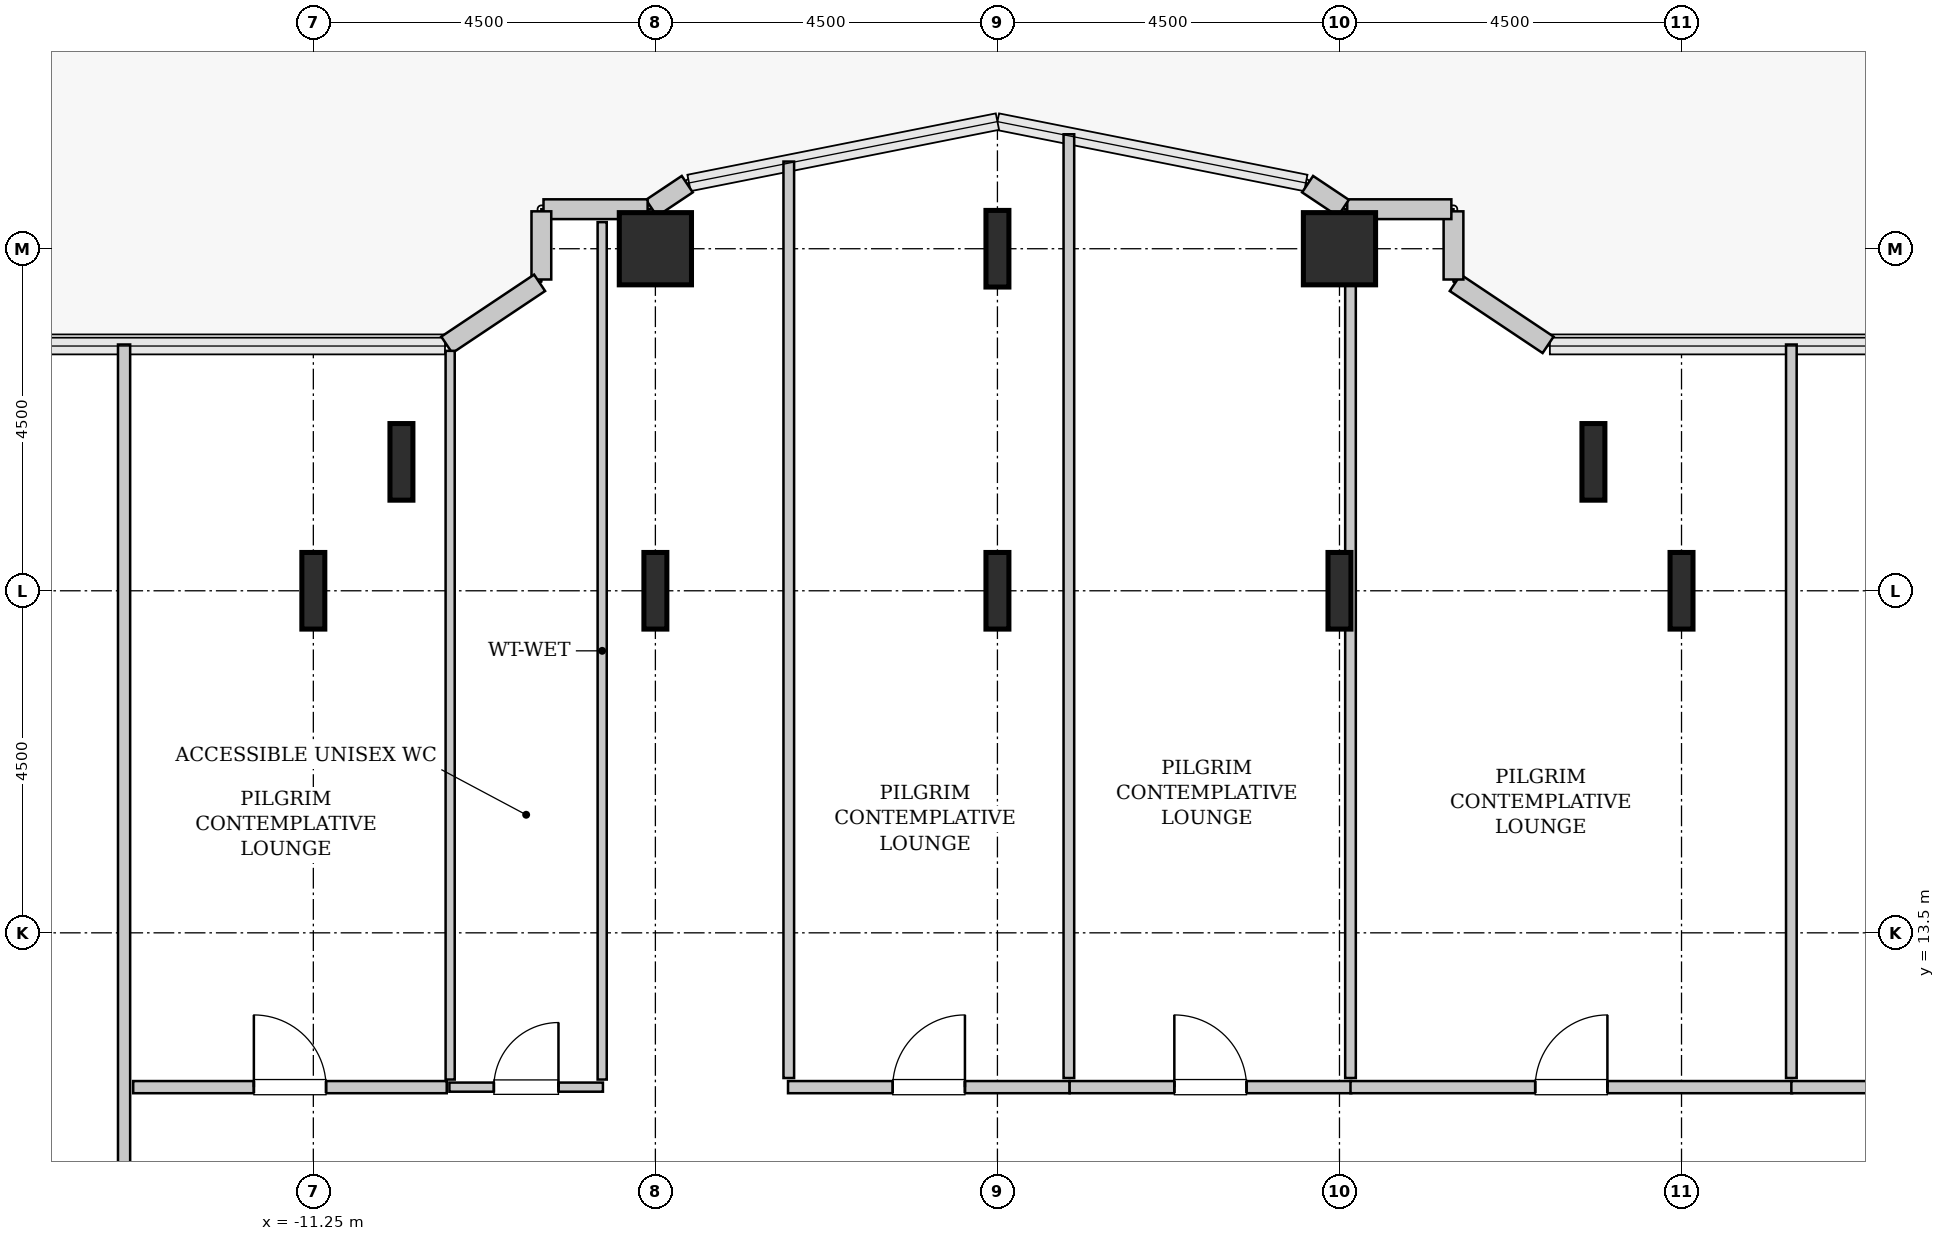
"""IFC4 building model, lengths in metres.
Left out: names, types, materials, properties, quantities, classifications, styles, units other than length and angle.
Written with IfcOpenShell. Run it as: python <this file> out.ifc"""

import sys

from ifc_helpers import new_model, si_unit, direction, frame, frame_2d, origin, origin_2d, place, context, subcontext, project, spatial, rectangle, hollow_rectangle, i_section, extrude, source, transform, mapped, element, fill, save


model = new_model("IFC4")
c1 = context("Model", 3, precision=1e-05, world=origin(), true_north=direction((0.0, 1.0)))
c2 = subcontext(c1, "Body", "Model", "MODEL_VIEW")
j1 = project(units=[si_unit("LENGTHUNIT", "METRE"), si_unit("PLANEANGLEUNIT", "RADIAN")], contexts=[c1])
p1 = place(None, origin())
s1 = spatial("IfcSite", under=j1, at=p1, CompositionType="ELEMENT")
p2 = place(p1, origin())
s2 = spatial("IfcBuilding", under=s1, at=p2, CompositionType="ELEMENT")
p3 = place(p2, frame((0.0, 0.0, 33.0)))
s3 = spatial("IfcBuildingStorey", under=s2, at=p3, CompositionType="ELEMENT", Elevation=33.0)
m1 = source(origin(), c2, "Body", "SweptSolid", [
    extrude(i_section(OverallWidth=0.302, OverallDepth=1.008, WebThickness=0.021, FlangeThickness=0.04, FilletRadius=0.03, at=origin_2d()), origin(), (0.0, 0.0, 1.0), 3.8),
])
for number, where, z_axis, x_axis in (
    (1, (-11.25, 18.0, 0.0), (0.0, 0.0, 1.0), (1.0, 0.0, 0.0)),
    (2, (-10.091, 19.696, 0.0), (0.0, 0.0, 1.0), (1.0, 0.0, 0.0)),
    (3, (-6.75, 18.0, 0.0), (0.0, 0.0, 1.0), (1.0, 0.0, 0.0)),
):
    element("IfcColumn", number, at=place(p3, frame(where, z_axis=z_axis, x_axis=x_axis)), inside=s3, PredefinedType="COLUMN", context=c2, shape_type="MappedRepresentation", body=[
        mapped(m1, transform((0.0, 0.0, 0.0), x_axis=(1.0, 0.0, 0.0), y_axis=(0.0, 1.0, 0.0), z_axis=(0.0, 0.0, 1.0), scale=1.0)),
    ])
m2 = source(origin(), c2, "Body", "SweptSolid", [
    extrude(hollow_rectangle(XDim=0.95, YDim=0.95, WallThickness=0.045, InnerFilletRadius=0.045, OuterFilletRadius=0.09, at=origin_2d()), origin(), (0.0, 0.0, 1.0), 3.8),
])
p4 = place(p3, frame((-6.75, 22.5, 0.0), z_axis=(0.0, 0.0, 1.0), x_axis=(1.0, 0.0, 0.0)))
e4 = element("IfcColumn", 4, at=p4, inside=s3, PredefinedType="COLUMN", context=c2, shape_type="MappedRepresentation", body=[
    mapped(m2, transform((0.0, 0.0, 0.0), x_axis=(1.0, 0.0, 0.0), y_axis=(0.0, 1.0, 0.0), z_axis=(0.0, 0.0, 1.0), scale=1.0)),
])
for number, where, z_axis, x_axis in (
    (5, (-2.25, 18.0, 0.0), (0.0, 0.0, 1.0), (1.0, 0.0, 0.0)),
    (6, (-2.25, 22.5, 0.0), (0.0, 0.0, 1.0), (1.0, 0.0, 0.0)),
    (7, (2.25, 18.0, 0.0), (0.0, 0.0, 1.0), (1.0, 0.0, 0.0)),
):
    element("IfcColumn", number, at=place(p3, frame(where, z_axis=z_axis, x_axis=x_axis)), inside=s3, PredefinedType="COLUMN", context=c2, shape_type="MappedRepresentation", body=[
        mapped(m1, transform((0.0, 0.0, 0.0), x_axis=(1.0, 0.0, 0.0), y_axis=(0.0, 1.0, 0.0), z_axis=(0.0, 0.0, 1.0), scale=1.0)),
    ])
p5 = place(p3, frame((2.25, 22.5, 0.0), z_axis=(0.0, 0.0, 1.0), x_axis=(1.0, 0.0, 0.0)))
e8 = element("IfcColumn", 8, at=p5, inside=s3, PredefinedType="COLUMN", context=c2, shape_type="MappedRepresentation", body=[
    mapped(m2, transform((0.0, 0.0, 0.0), x_axis=(1.0, 0.0, 0.0), y_axis=(0.0, 1.0, 0.0), z_axis=(0.0, 0.0, 1.0), scale=1.0)),
])
for number, where, z_axis, x_axis in (
    (9, (5.591, 19.696, 0.0), (0.0, 0.0, 1.0), (1.0, 0.0, 0.0)),
    (10, (6.75, 18.0, 0.0), (0.0, 0.0, 1.0), (1.0, 0.0, 0.0)),
):
    element("IfcColumn", number, at=place(p3, frame(where, z_axis=z_axis, x_axis=x_axis)), inside=s3, PredefinedType="COLUMN", context=c2, shape_type="MappedRepresentation", body=[
        mapped(m1, transform((0.0, 0.0, 0.0), x_axis=(1.0, 0.0, 0.0), y_axis=(0.0, 1.0, 0.0), z_axis=(0.0, 0.0, 1.0), scale=1.0)),
    ])
m3 = source(origin(), c2, "Body", "SweptSolid", [
    extrude(rectangle(XDim=1.469, YDim=0.26, at=frame_2d((0.734, 0.0))), origin(), (0.0, 0.0, 1.0), 3.55),
])
p6 = place(p3, frame((4.995, 21.236, 0.0), z_axis=(0.0, 0.0, 1.0), x_axis=(-0.831461760506, 0.555581983884, 0.0)))
e11 = element("IfcWall", 11, at=p6, inside=s3, PredefinedType="SOLIDWALL", context=c2, shape_type="MappedRepresentation", body=[
    mapped(m3, transform((0.0, 0.0, 0.0), x_axis=(1.0, 0.0, 0.0), y_axis=(0.0, 1.0, 0.0), z_axis=(0.0, 0.0, 1.0), scale=1.0)),
])
m4 = source(origin(), c2, "Body", "SweptSolid", [
    extrude(rectangle(XDim=0.897, YDim=0.26, at=frame_2d((0.448, 0.0))), origin(), (0.0, 0.0, 1.0), 3.55),
])
p7 = place(p3, frame((3.75, 22.095, 0.0), z_axis=(0.0, 0.0, 1.0), x_axis=(0.0, 1.0, 0.0)))
e12 = element("IfcWall", 12, at=p7, inside=s3, PredefinedType="SOLIDWALL", context=c2, shape_type="MappedRepresentation", body=[
    mapped(m4, transform((0.0, 0.0, 0.0), x_axis=(1.0, 0.0, 0.0), y_axis=(0.0, 1.0, 0.0), z_axis=(0.0, 0.0, 1.0), scale=1.0)),
])
m5 = source(origin(), c2, "Body", "SweptSolid", [
    extrude(rectangle(XDim=1.37, YDim=0.26, at=frame_2d((0.685, 0.0))), origin(), (0.0, 0.0, 1.0), 3.55),
])
p8 = place(p3, frame((3.722, 23.02, 0.0), z_axis=(0.0, 0.0, 1.0), x_axis=(-1.0, 0.0, 0.0)))
e13 = element("IfcWall", 13, at=p8, inside=s3, PredefinedType="SOLIDWALL", context=c2, shape_type="MappedRepresentation", body=[
    mapped(m5, transform((0.0, 0.0, 0.0), x_axis=(1.0, 0.0, 0.0), y_axis=(0.0, 1.0, 0.0), z_axis=(0.0, 0.0, 1.0), scale=1.0)),
])
m6 = source(origin(), c2, "Body", "SweptSolid", [
    extrude(rectangle(XDim=0.565, YDim=0.26, at=frame_2d((0.283, 0.0))), origin(), (0.0, 0.0, 1.0), 3.55),
])
for number, where, z_axis, x_axis in (
    (14, (2.301, 23.036, 0.0), (0.0, 0.0, 1.0), (-0.832, 0.555, 0.0)),
    (15, (-6.331, 23.35, 0.0), (0.0, 0.0, 1.0), (-0.832, -0.555, 0.0)),
):
    element("IfcWall", number, at=place(p3, frame(where, z_axis=z_axis, x_axis=x_axis)), inside=s3, PredefinedType="SOLIDWALL", context=c2, shape_type="MappedRepresentation", body=[
        mapped(m6, transform((0.0, 0.0, 0.0), x_axis=(1.0, 0.0, 0.0), y_axis=(0.0, 1.0, 0.0), z_axis=(0.0, 0.0, 1.0), scale=1.0)),
    ])
p9 = place(p3, frame((-6.852, 23.02, 0.0), z_axis=(0.0, 0.0, 1.0), x_axis=(-1.0, 0.0, 0.0)))
e16 = element("IfcWall", 16, at=p9, inside=s3, PredefinedType="SOLIDWALL", context=c2, shape_type="MappedRepresentation", body=[
    mapped(m5, transform((0.0, 0.0, 0.0), x_axis=(1.0, 0.0, 0.0), y_axis=(0.0, 1.0, 0.0), z_axis=(0.0, 0.0, 1.0), scale=1.0)),
])
p10 = place(p3, frame((-8.25, 22.992, 0.0), z_axis=(0.0, 0.0, 1.0), x_axis=(0.0, -1.0, 0.0)))
e17 = element("IfcWall", 17, at=p10, inside=s3, PredefinedType="SOLIDWALL", context=c2, shape_type="MappedRepresentation", body=[
    mapped(m4, transform((0.0, 0.0, 0.0), x_axis=(1.0, 0.0, 0.0), y_axis=(0.0, 1.0, 0.0), z_axis=(0.0, 0.0, 1.0), scale=1.0)),
])
p11 = place(p3, frame((-8.273, 22.052, 0.0), z_axis=(0.0, 0.0, 1.0), x_axis=(-0.831461760506, -0.555581983884, 0.0)))
e18 = element("IfcWall", 18, at=p11, inside=s3, PredefinedType="SOLIDWALL", context=c2, shape_type="MappedRepresentation", body=[
    mapped(m3, transform((0.0, 0.0, 0.0), x_axis=(1.0, 0.0, 0.0), y_axis=(0.0, 1.0, 0.0), z_axis=(0.0, 0.0, 1.0), scale=1.0)),
])
m7 = source(origin(), c2, "Body", "SweptSolid", [
    extrude(rectangle(XDim=2.02, YDim=0.12, at=frame_2d((1.01, 0.0))), origin(), (0.0, 0.0, 1.0), 3.535),
])
p12 = place(p3, frame((-9.46, 11.47, 0.0), z_axis=(0.0, 0.0, 1.0), x_axis=(1.0, 0.0, 0.0)))
e19 = element("IfcWall", 19, at=p12, inside=s3, PredefinedType="PLUMBINGWALL", context=c2, shape_type="MappedRepresentation", body=[
    mapped(m7, transform((0.0, 0.0, 0.0), x_axis=(1.0, 0.0, 0.0), y_axis=(0.0, 1.0, 0.0), z_axis=(0.0, 0.0, 1.0), scale=1.0)),
])
p13 = place(p12, frame((0.585, 0.0, 0.0)))
e20 = element("IfcOpeningElement", 20, at=p13, cuts=e19, PredefinedType="OPENING", context=c2, shape_type="SweptSolid", body=[
    extrude(rectangle(XDim=0.85, YDim=2.1, at=frame_2d((0.425, 1.05))), frame((0.0, 0.07, 0.0), z_axis=(0.0, -1.0, 0.0), x_axis=(1.0, 0.0, 0.0)), (0.0, 0.0, 1.0), 0.14),
])
m8 = source(origin(), c2, "Body", "SweptSolid", [
    extrude(rectangle(XDim=11.28, YDim=0.12, at=frame_2d((5.64, 0.0))), origin(), (0.0, 0.0, 1.0), 3.535),
])
p14 = place(p3, frame((-7.45, 11.57, 0.0), z_axis=(0.0, 0.0, 1.0), x_axis=(0.0, 1.0, 0.0)))
e21 = element("IfcWall", 21, at=p14, inside=s3, PredefinedType="PLUMBINGWALL", context=c2, shape_type="MappedRepresentation", body=[
    mapped(m8, transform((0.0, 0.0, 0.0), x_axis=(1.0, 0.0, 0.0), y_axis=(0.0, 1.0, 0.0), z_axis=(0.0, 0.0, 1.0), scale=1.0)),
])
m9 = source(origin(), c2, "Body", "SweptSolid", [
    extrude(rectangle(XDim=9.587, YDim=0.12, at=frame_2d((4.793, 0.0))), origin(), (0.0, 0.0, 1.0), 3.535),
])
p15 = place(p3, frame((-9.45, 11.57, 0.0), z_axis=(0.0, 0.0, 1.0), x_axis=(0.0, 1.0, 0.0)))
e22 = element("IfcWall", 22, at=p15, inside=s3, PredefinedType="PLUMBINGWALL", context=c2, shape_type="MappedRepresentation", body=[
    mapped(m9, transform((0.0, 0.0, 0.0), x_axis=(1.0, 0.0, 0.0), y_axis=(0.0, 1.0, 0.0), z_axis=(0.0, 0.0, 1.0), scale=1.0)),
])
m10 = source(origin(), c2, "Body", "SweptSolid", [
    extrude(rectangle(XDim=16.045, YDim=0.16, at=frame_2d((8.022, 0.0))), origin(), (0.0, 0.0, 1.0), 3.535),
])
p16 = place(p3, frame((-13.74, 5.195, 0.0), z_axis=(0.0, 0.0, 1.0), x_axis=(0.0, 1.0, 0.0)))
e23 = element("IfcWall", 23, at=p16, inside=s3, PredefinedType="PARTITIONING", context=c2, shape_type="MappedRepresentation", body=[
    mapped(m10, transform((0.0, 0.0, 0.0), x_axis=(1.0, 0.0, 0.0), y_axis=(0.0, 1.0, 0.0), z_axis=(0.0, 0.0, 1.0), scale=1.0)),
])
p17 = place(p16, frame((2.683, 0.0, 0.0)))
e24 = element("IfcOpeningElement", 24, at=p17, cuts=e23, PredefinedType="OPENING", context=c2, shape_type="SweptSolid", body=[
    extrude(rectangle(XDim=0.95, YDim=2.1, at=frame_2d((0.475, 1.05))), frame((0.0, 0.09, 0.0), z_axis=(0.0, -1.0, 0.0), x_axis=(1.0, 0.0, 0.0)), (0.0, 0.0, 1.0), 0.18),
])
m11 = source(origin(), c2, "Body", "SweptSolid", [
    extrude(rectangle(XDim=4.125, YDim=0.16, at=frame_2d((2.062, 0.0))), origin(), (0.0, 0.0, 1.0), 3.535),
])
p18 = place(p3, frame((-13.62, 11.47, 0.0), z_axis=(0.0, 0.0, 1.0), x_axis=(1.0, 0.0, 0.0)))
e25 = element("IfcWall", 25, at=p18, inside=s3, PredefinedType="PARTITIONING", context=c2, shape_type="MappedRepresentation", body=[
    mapped(m11, transform((0.0, 0.0, 0.0), x_axis=(1.0, 0.0, 0.0), y_axis=(0.0, 1.0, 0.0), z_axis=(0.0, 0.0, 1.0), scale=1.0)),
])
p19 = place(p18, frame((1.587, 0.0, 0.0)))
e26 = element("IfcOpeningElement", 26, at=p19, cuts=e25, PredefinedType="OPENING", context=c2, shape_type="SweptSolid", body=[
    extrude(rectangle(XDim=0.95, YDim=2.1, at=frame_2d((0.475, 1.05))), frame((0.0, 0.09, 0.0), z_axis=(0.0, -1.0, 0.0), x_axis=(1.0, 0.0, 0.0)), (0.0, 0.0, 1.0), 0.18),
])
m12 = source(origin(), c2, "Body", "SweptSolid", [
    extrude(rectangle(XDim=3.705, YDim=0.16, at=frame_2d((1.853, 0.0))), origin(), (0.0, 0.0, 1.0), 3.535),
])
p20 = place(p3, frame((-5.005, 11.47, 0.0), z_axis=(0.0, 0.0, 1.0), x_axis=(1.0, 0.0, 0.0)))
e27 = element("IfcWall", 27, at=p20, inside=s3, PredefinedType="PARTITIONING", context=c2, shape_type="MappedRepresentation", body=[
    mapped(m12, transform((0.0, 0.0, 0.0), x_axis=(1.0, 0.0, 0.0), y_axis=(0.0, 1.0, 0.0), z_axis=(0.0, 0.0, 1.0), scale=1.0)),
])
p21 = place(p20, frame((1.377, 0.0, 0.0)))
e28 = element("IfcOpeningElement", 28, at=p21, cuts=e27, PredefinedType="OPENING", context=c2, shape_type="SweptSolid", body=[
    extrude(rectangle(XDim=0.95, YDim=2.1, at=frame_2d((0.475, 1.05))), frame((0.0, 0.09, 0.0), z_axis=(0.0, -1.0, 0.0), x_axis=(1.0, 0.0, 0.0)), (0.0, 0.0, 1.0), 0.18),
])
m13 = source(origin(), c2, "Body", "SweptSolid", [
    extrude(rectangle(XDim=12.416, YDim=0.14, at=frame_2d((6.208, 0.0))), origin(), (0.0, 0.0, 1.0), 3.535),
])
p22 = place(p3, frame((-1.31, 11.59, 0.0), z_axis=(0.0, 0.0, 1.0), x_axis=(0.0, 1.0, 0.0)))
e29 = element("IfcWall", 29, at=p22, inside=s3, PredefinedType="PARTITIONING", context=c2, shape_type="MappedRepresentation", body=[
    mapped(m13, transform((0.0, 0.0, 0.0), x_axis=(1.0, 0.0, 0.0), y_axis=(0.0, 1.0, 0.0), z_axis=(0.0, 0.0, 1.0), scale=1.0)),
])
m14 = source(origin(), c2, "Body", "SweptSolid", [
    extrude(rectangle(XDim=12.057, YDim=0.14, at=frame_2d((6.028, 0.0))), origin(), (0.0, 0.0, 1.0), 3.535),
])
p23 = place(p3, frame((-4.995, 11.59, 0.0), z_axis=(0.0, 0.0, 1.0), x_axis=(0.0, 1.0, 0.0)))
e30 = element("IfcWall", 30, at=p23, inside=s3, PredefinedType="PARTITIONING", context=c2, shape_type="MappedRepresentation", body=[
    mapped(m14, transform((0.0, 0.0, 0.0), x_axis=(1.0, 0.0, 0.0), y_axis=(0.0, 1.0, 0.0), z_axis=(0.0, 0.0, 1.0), scale=1.0)),
])
m15 = source(origin(), c2, "Body", "SweptSolid", [
    extrude(rectangle(XDim=3.705, YDim=0.16, at=frame_2d((1.853, 0.0))), origin(), (0.0, 0.0, 1.0), 3.535),
])
p24 = place(p3, frame((-1.3, 11.47, 0.0), z_axis=(0.0, 0.0, 1.0), x_axis=(1.0, 0.0, 0.0)))
e31 = element("IfcWall", 31, at=p24, inside=s3, PredefinedType="PARTITIONING", context=c2, shape_type="MappedRepresentation", body=[
    mapped(m15, transform((0.0, 0.0, 0.0), x_axis=(1.0, 0.0, 0.0), y_axis=(0.0, 1.0, 0.0), z_axis=(0.0, 0.0, 1.0), scale=1.0)),
])
p25 = place(p24, frame((1.377, 0.0, 0.0)))
e32 = element("IfcOpeningElement", 32, at=p25, cuts=e31, PredefinedType="OPENING", context=c2, shape_type="SweptSolid", body=[
    extrude(rectangle(XDim=0.95, YDim=2.1, at=frame_2d((0.475, 1.05))), frame((0.0, 0.09, 0.0), z_axis=(0.0, -1.0, 0.0), x_axis=(1.0, 0.0, 0.0)), (0.0, 0.0, 1.0), 0.18),
])
m16 = source(origin(), c2, "Body", "SweptSolid", [
    extrude(rectangle(XDim=11.26, YDim=0.14, at=frame_2d((5.63, 0.0))), origin(), (0.0, 0.0, 1.0), 2.825),
])
p26 = place(p3, frame((2.395, 11.59, 0.0), z_axis=(0.0, 0.0, 1.0), x_axis=(0.0, 1.0, 0.0)))
e33 = element("IfcWall", 33, at=p26, inside=s3, PredefinedType="PARTITIONING", context=c2, shape_type="MappedRepresentation", body=[
    mapped(m16, transform((0.0, 0.0, 0.0), x_axis=(1.0, 0.0, 0.0), y_axis=(0.0, 1.0, 0.0), z_axis=(0.0, 0.0, 1.0), scale=1.0)),
])
m17 = source(origin(), c2, "Body", "SweptSolid", [
    extrude(rectangle(XDim=5.81, YDim=0.16, at=frame_2d((2.905, 0.0))), origin(), (0.0, 0.0, 1.0), 3.535),
])
p27 = place(p3, frame((2.395, 11.47, 0.0), z_axis=(0.0, 0.0, 1.0), x_axis=(1.0, 0.0, 0.0)))
e34 = element("IfcWall", 34, at=p27, inside=s3, PredefinedType="PARTITIONING", context=c2, shape_type="MappedRepresentation", body=[
    mapped(m17, transform((0.0, 0.0, 0.0), x_axis=(1.0, 0.0, 0.0), y_axis=(0.0, 1.0, 0.0), z_axis=(0.0, 0.0, 1.0), scale=1.0)),
])
p28 = place(p27, frame((2.43, 0.0, 0.0)))
e35 = element("IfcOpeningElement", 35, at=p28, cuts=e34, PredefinedType="OPENING", context=c2, shape_type="SweptSolid", body=[
    extrude(rectangle(XDim=0.95, YDim=2.1, at=frame_2d((0.475, 1.05))), frame((0.0, 0.09, 0.0), z_axis=(0.0, -1.0, 0.0), x_axis=(1.0, 0.0, 0.0)), (0.0, 0.0, 1.0), 0.18),
])
m18 = source(origin(), c2, "Body", "SweptSolid", [
    extrude(rectangle(XDim=9.65, YDim=0.14, at=frame_2d((4.825, 0.0))), origin(), (0.0, 0.0, 1.0), 3.535),
])
p29 = place(p3, frame((8.195, 11.59, 0.0), z_axis=(0.0, 0.0, 1.0), x_axis=(0.0, 1.0, 0.0)))
e36 = element("IfcWall", 36, at=p29, inside=s3, PredefinedType="PARTITIONING", context=c2, shape_type="MappedRepresentation", body=[
    mapped(m18, transform((0.0, 0.0, 0.0), x_axis=(1.0, 0.0, 0.0), y_axis=(0.0, 1.0, 0.0), z_axis=(0.0, 0.0, 1.0), scale=1.0)),
])
m19 = source(origin(), c2, "Body", "SweptSolid", [
    extrude(rectangle(XDim=5.425, YDim=0.16, at=frame_2d((2.712, 0.0))), origin(), (0.0, 0.0, 1.0), 3.535),
])
p30 = place(p3, frame((8.195, 11.47, 0.0), z_axis=(0.0, 0.0, 1.0), x_axis=(1.0, 0.0, 0.0)))
e37 = element("IfcWall", 37, at=p30, inside=s3, PredefinedType="PARTITIONING", context=c2, shape_type="MappedRepresentation", body=[
    mapped(m19, transform((0.0, 0.0, 0.0), x_axis=(1.0, 0.0, 0.0), y_axis=(0.0, 1.0, 0.0), z_axis=(0.0, 0.0, 1.0), scale=1.0)),
])
p31 = place(p30, frame((2.238, 0.0, 0.0)))
e38 = element("IfcOpeningElement", 38, at=p31, cuts=e37, PredefinedType="OPENING", context=c2, shape_type="SweptSolid", body=[
    extrude(rectangle(XDim=0.95, YDim=2.1, at=frame_2d((0.475, 1.05))), frame((0.0, 0.09, 0.0), z_axis=(0.0, -1.0, 0.0), x_axis=(1.0, 0.0, 0.0)), (0.0, 0.0, 1.0), 0.18),
])
m20 = source(origin(), c2, "Body", "SweptSolid", [
    extrude(rectangle(XDim=0.85, YDim=2.1, at=frame_2d((0.425, 1.05))), frame((0.0, 0.025, 0.0), z_axis=(0.0, -1.0, 0.0), x_axis=(1.0, 0.0, 0.0)), (0.0, 0.0, 1.0), 0.05),
])
p32 = place(p13, origin())
e39 = element("IfcDoor", 39, at=p32, inside=s3, OperationType="SINGLE_SWING_RIGHT", PredefinedType="DOOR", context=c2, shape_type="MappedRepresentation", body=[
    mapped(m20, transform((0.0, 0.0, 0.0), x_axis=(1.0, 0.0, 0.0), y_axis=(0.0, 1.0, 0.0), z_axis=(0.0, 0.0, 1.0), scale=1.0)),
])
fill(e20, e39)
m21 = source(origin(), c2, "Body", "SweptSolid", [
    extrude(rectangle(XDim=0.95, YDim=2.1, at=frame_2d((0.475, 1.05))), frame((0.0, 0.025, 0.0), z_axis=(0.0, -1.0, 0.0), x_axis=(1.0, 0.0, 0.0)), (0.0, 0.0, 1.0), 0.05),
])
p33 = place(p19, origin())
e40 = element("IfcDoor", 40, at=p33, inside=s3, OperationType="SINGLE_SWING_LEFT", PredefinedType="DOOR", context=c2, shape_type="MappedRepresentation", body=[
    mapped(m21, transform((0.0, 0.0, 0.0), x_axis=(1.0, 0.0, 0.0), y_axis=(0.0, 1.0, 0.0), z_axis=(0.0, 0.0, 1.0), scale=1.0)),
])
fill(e26, e40)
p34 = place(p21, origin())
e41 = element("IfcDoor", 41, at=p34, inside=s3, OperationType="SINGLE_SWING_RIGHT", PredefinedType="DOOR", context=c2, shape_type="MappedRepresentation", body=[
    mapped(m21, transform((0.0, 0.0, 0.0), x_axis=(1.0, 0.0, 0.0), y_axis=(0.0, 1.0, 0.0), z_axis=(0.0, 0.0, 1.0), scale=1.0)),
])
fill(e28, e41)
p35 = place(p25, origin())
e42 = element("IfcDoor", 42, at=p35, inside=s3, OperationType="SINGLE_SWING_LEFT", PredefinedType="DOOR", context=c2, shape_type="MappedRepresentation", body=[
    mapped(m21, transform((0.0, 0.0, 0.0), x_axis=(1.0, 0.0, 0.0), y_axis=(0.0, 1.0, 0.0), z_axis=(0.0, 0.0, 1.0), scale=1.0)),
])
fill(e32, e42)
p36 = place(p28, origin())
e43 = element("IfcDoor", 43, at=p36, inside=s3, OperationType="SINGLE_SWING_RIGHT", PredefinedType="DOOR", context=c2, shape_type="MappedRepresentation", body=[
    mapped(m21, transform((0.0, 0.0, 0.0), x_axis=(1.0, 0.0, 0.0), y_axis=(0.0, 1.0, 0.0), z_axis=(0.0, 0.0, 1.0), scale=1.0)),
])
fill(e35, e43)
save(model, sys.argv[1])
